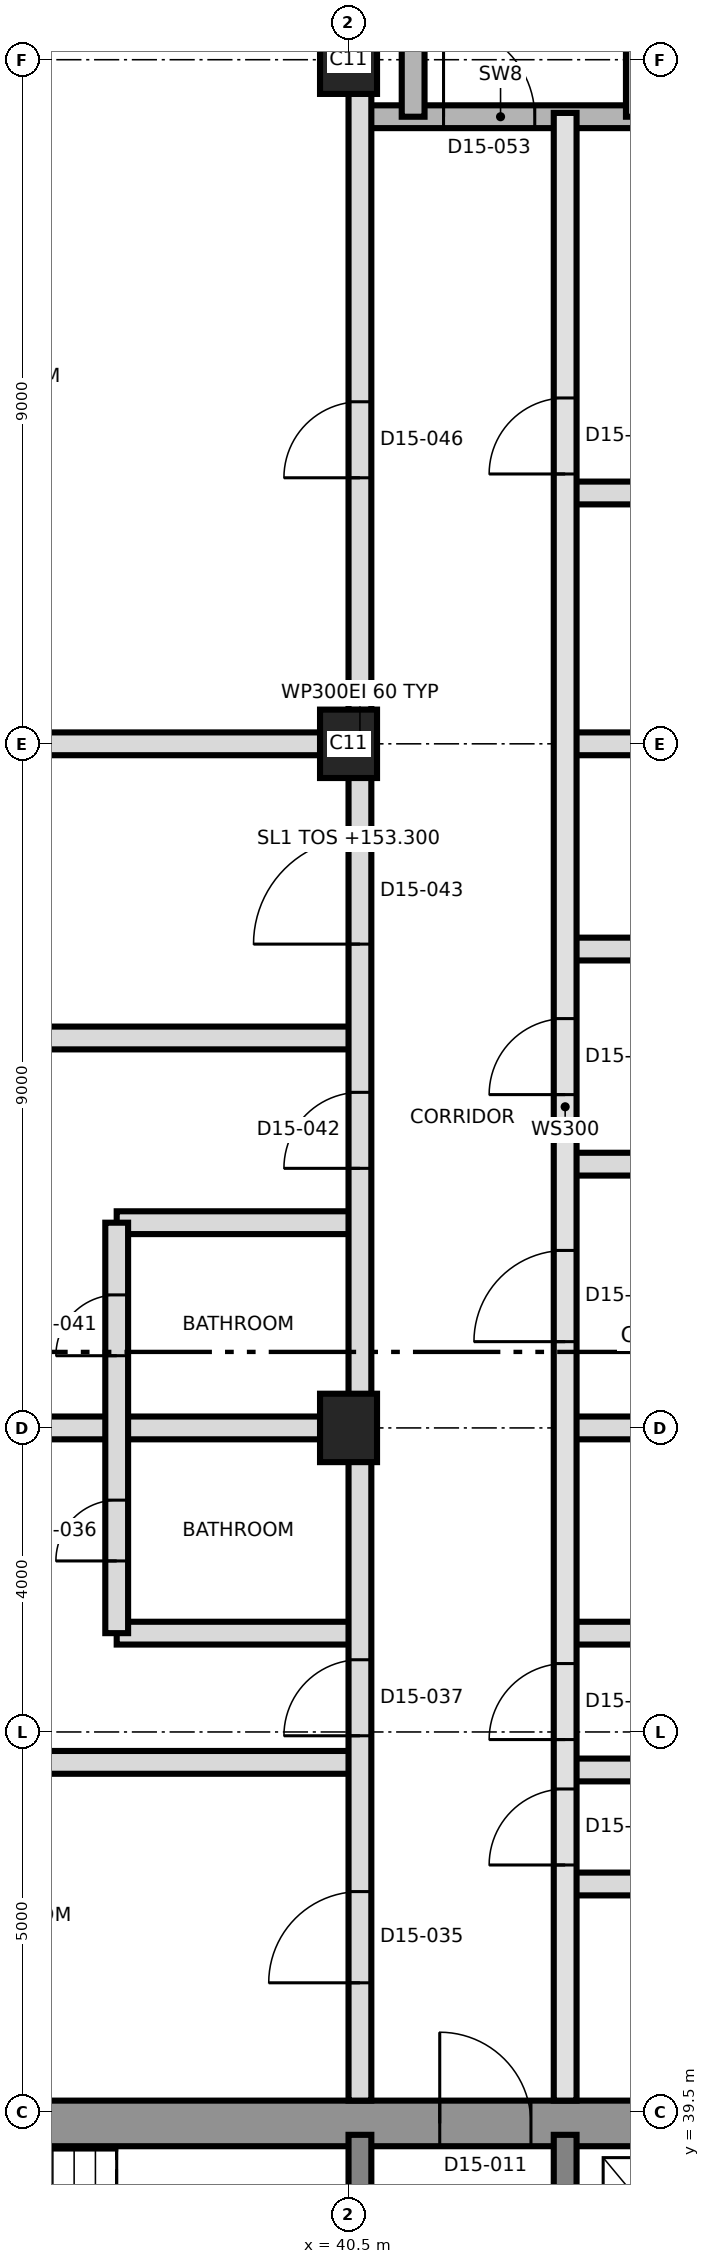
"""IFC4 building model, lengths in metres.
Left out: names, types, materials, properties, quantities, classifications, styles, units other than length and angle.
Written with IfcOpenShell. Run it as: python <this file> out.ifc"""

import sys

from ifc_helpers import new_model, si_unit, direction, frame, frame_2d, origin, origin_2d, place, context, subcontext, project, spatial, rectangle, extrude, element, fill, save


model = new_model("IFC4")
c1 = context("Model", 3, precision=1e-05, world=origin(), true_north=direction((0.0, 1.0)))
c2 = subcontext(c1, "Body", "Model", "MODEL_VIEW")
j1 = project(units=[si_unit("LENGTHUNIT", "METRE"), si_unit("PLANEANGLEUNIT", "RADIAN")], contexts=[c1])
p1 = place(None, origin())
s1 = spatial("IfcSite", under=j1, at=p1, CompositionType="ELEMENT")
p2 = place(p1, origin())
s2 = spatial("IfcBuilding", under=s1, at=p2, CompositionType="ELEMENT")
p3 = place(p2, frame((0.0, 0.0, 153.3)))
s3 = spatial("IfcBuildingStorey", under=s2, at=p3, CompositionType="ELEMENT", Elevation=153.3)
p4 = place(p3, frame((31.2, 39.35, 0.0), z_axis=(0.0, 0.0, 1.0), x_axis=(1.0, 0.0, 0.0)))
e1 = element("IfcWall", 1, at=p4, inside=s3, PredefinedType="SHEAR", context=c2, shape_type="SweptSolid", body=[
    extrude(rectangle(XDim=27.0, YDim=0.6, at=frame_2d((13.5, 0.0))), origin(), (0.0, 0.0, 1.0), 3.7),
])
p5 = place(p4, frame((10.5, 0.0, 0.0)))
e2 = element("IfcOpeningElement", 2, at=p5, cuts=e1, PredefinedType="OPENING", context=c2, shape_type="SweptSolid", body=[
    extrude(rectangle(XDim=1.2, YDim=2.1, at=frame_2d((0.6, 1.05))), frame((0.0, 0.31, 0.0), z_axis=(0.0, -1.0, 0.0), x_axis=(1.0, 0.0, 0.0)), (0.0, 0.0, 1.0), 0.62),
])
for number, where, z_axis, x_axis in (
    (3, (40.65, 33.5, 0.0), (0.0, 0.0, 1.0), (0.0, 1.0, 0.0)),
    (4, (43.35, 33.5, 0.0), (0.0, 0.0, 1.0), (0.0, 1.0, 0.0)),
):
    element("IfcWall", number, at=place(p3, frame(where, z_axis=z_axis, x_axis=x_axis)), inside=s3, PredefinedType="SHEAR", context=c2, shape_type="SweptSolid", body=[
        extrude(rectangle(XDim=5.7, YDim=0.3, at=frame_2d((2.85, 0.0))), origin(), (0.0, 0.0, 1.0), 3.7),
    ])
for number, where, z_axis, x_axis in (
    (5, (40.5, 48.5, 0.0), (0.0, 0.0, 1.0), (0.0, 1.0, 0.0)),
    (6, (40.5, 57.5, 0.0), (0.0, 0.0, 1.0), (0.0, 1.0, 0.0)),
    (7, (40.5, 66.5, 0.0), (0.0, 0.0, 1.0), (0.0, 1.0, 0.0)),
):
    element("IfcColumn", number, at=place(p3, frame(where, z_axis=z_axis, x_axis=x_axis)), inside=s3, PredefinedType="COLUMN", context=c2, shape_type="SweptSolid", body=[
        extrude(rectangle(XDim=0.9, YDim=0.75, at=origin_2d()), origin(), (0.0, 0.0, 1.0), 3.7),
    ])
p6 = place(p3, frame((43.35, 42.5, 0.0), z_axis=(0.0, 0.0, 1.0), x_axis=(1.0, 0.0, 0.0)))
e8 = element("IfcWall", 8, at=p6, inside=s3, PredefinedType="PARTITIONING", context=c2, shape_type="SweptSolid", body=[
    extrude(rectangle(XDim=3.3, YDim=0.3, at=frame_2d((1.65, 0.0))), origin(), (0.0, 0.0, 1.0), 3.4),
])
p7 = place(p3, frame((43.35, 44.0, 0.0), z_axis=(0.0, 0.0, 1.0), x_axis=(1.0, 0.0, 0.0)))
e9 = element("IfcWall", 9, at=p7, inside=s3, PredefinedType="PARTITIONING", context=c2, shape_type="SweptSolid", body=[
    extrude(rectangle(XDim=6.701, YDim=0.3, at=frame_2d((3.351, 0.0))), origin(), (0.0, 0.0, 1.0), 3.4),
])
p8 = place(p3, frame((31.425, 44.1, 0.0), z_axis=(0.0, 0.0, 1.0), x_axis=(1.0, 0.0, 0.0)))
e10 = element("IfcWall", 10, at=p8, inside=s3, PredefinedType="PARTITIONING", context=c2, shape_type="SweptSolid", body=[
    extrude(rectangle(XDim=9.225, YDim=0.3, at=frame_2d((4.612, 0.0))), origin(), (0.0, 0.0, 1.0), 3.4),
])
for number, where, z_axis, x_axis in (
    (11, (37.45, 45.8, 0.0), (0.0, 0.0, 1.0), (1.0, 0.0, 0.0)),
    (12, (43.35, 45.8, 0.0), (0.0, 0.0, 1.0), (1.0, 0.0, 0.0)),
):
    element("IfcWall", number, at=place(p3, frame(where, z_axis=z_axis, x_axis=x_axis)), inside=s3, PredefinedType="PARTITIONING", context=c2, shape_type="SweptSolid", body=[
        extrude(rectangle(XDim=3.2, YDim=0.3, at=frame_2d((1.6, 0.0))), origin(), (0.0, 0.0, 1.0), 3.4),
    ])
p9 = place(p3, frame((31.425, 48.5, 0.0), z_axis=(0.0, 0.0, 1.0), x_axis=(1.0, 0.0, 0.0)))
e13 = element("IfcWall", 13, at=p9, inside=s3, PredefinedType="PARTITIONING", context=c2, shape_type="SweptSolid", body=[
    extrude(rectangle(XDim=9.225, YDim=0.3, at=frame_2d((4.612, 0.0))), origin(), (0.0, 0.0, 1.0), 3.4),
])
p10 = place(p3, frame((43.35, 48.5, 0.0), z_axis=(0.0, 0.0, 1.0), x_axis=(1.0, 0.0, 0.0)))
e14 = element("IfcWall", 14, at=p10, inside=s3, PredefinedType="PARTITIONING", context=c2, shape_type="SweptSolid", body=[
    extrude(rectangle(XDim=6.225, YDim=0.3, at=frame_2d((3.112, 0.0))), origin(), (0.0, 0.0, 1.0), 3.4),
])
p11 = place(p3, frame((37.45, 51.2, 0.0), z_axis=(0.0, 0.0, 1.0), x_axis=(1.0, 0.0, 0.0)))
e15 = element("IfcWall", 15, at=p11, inside=s3, PredefinedType="PARTITIONING", context=c2, shape_type="SweptSolid", body=[
    extrude(rectangle(XDim=3.2, YDim=0.3, at=frame_2d((1.6, 0.0))), origin(), (0.0, 0.0, 1.0), 3.4),
])
p12 = place(p3, frame((43.35, 51.97, 0.0), z_axis=(0.0, 0.0, 1.0), x_axis=(1.0, 0.0, 0.0)))
e16 = element("IfcWall", 16, at=p12, inside=s3, PredefinedType="PARTITIONING", context=c2, shape_type="SweptSolid", body=[
    extrude(rectangle(XDim=6.405, YDim=0.3, at=frame_2d((3.202, 0.0))), origin(), (0.0, 0.0, 1.0), 3.4),
])
p13 = place(p3, frame((31.425, 53.63, 0.0), z_axis=(0.0, 0.0, 1.0), x_axis=(1.0, 0.0, 0.0)))
e17 = element("IfcWall", 17, at=p13, inside=s3, PredefinedType="PARTITIONING", context=c2, shape_type="SweptSolid", body=[
    extrude(rectangle(XDim=9.225, YDim=0.3, at=frame_2d((4.612, 0.0))), origin(), (0.0, 0.0, 1.0), 3.4),
])
p14 = place(p3, frame((43.35, 54.8, 0.0), z_axis=(0.0, 0.0, 1.0), x_axis=(1.0, 0.0, 0.0)))
e18 = element("IfcWall", 18, at=p14, inside=s3, PredefinedType="PARTITIONING", context=c2, shape_type="SweptSolid", body=[
    extrude(rectangle(XDim=3.2, YDim=0.3, at=frame_2d((1.6, 0.0))), origin(), (0.0, 0.0, 1.0), 3.4),
])
p15 = place(p3, frame((31.425, 57.5, 0.0), z_axis=(0.0, 0.0, 1.0), x_axis=(1.0, 0.0, 0.0)))
e19 = element("IfcWall", 19, at=p15, inside=s3, PredefinedType="PARTITIONING", context=c2, shape_type="SweptSolid", body=[
    extrude(rectangle(XDim=9.225, YDim=0.3, at=frame_2d((4.612, 0.0))), origin(), (0.0, 0.0, 1.0), 3.4),
])
p16 = place(p3, frame((43.35, 57.5, 0.0), z_axis=(0.0, 0.0, 1.0), x_axis=(1.0, 0.0, 0.0)))
e20 = element("IfcWall", 20, at=p16, inside=s3, PredefinedType="PARTITIONING", context=c2, shape_type="SweptSolid", body=[
    extrude(rectangle(XDim=6.225, YDim=0.3, at=frame_2d((3.112, 0.0))), origin(), (0.0, 0.0, 1.0), 3.4),
])
p17 = place(p3, frame((43.35, 60.8, 0.0), z_axis=(0.0, 0.0, 1.0), x_axis=(1.0, 0.0, 0.0)))
e21 = element("IfcWall", 21, at=p17, inside=s3, PredefinedType="PARTITIONING", context=c2, shape_type="SweptSolid", body=[
    extrude(rectangle(XDim=3.5, YDim=0.3, at=frame_2d((1.75, 0.0))), origin(), (0.0, 0.0, 1.0), 3.4),
])
p18 = place(p3, frame((40.65, 65.75, 0.0), z_axis=(0.0, 0.0, 1.0), x_axis=(1.0, 0.0, 0.0)))
e22 = element("IfcWall", 22, at=p18, inside=s3, PredefinedType="SHEAR", context=c2, shape_type="SweptSolid", body=[
    extrude(rectangle(XDim=3.7, YDim=0.3, at=frame_2d((1.85, 0.0))), origin(), (0.0, 0.0, 1.0), 3.4),
])
p19 = place(p18, frame((1.1, 0.0, 0.0)))
e23 = element("IfcOpeningElement", 23, at=p19, cuts=e22, PredefinedType="OPENING", context=c2, shape_type="SweptSolid", body=[
    extrude(rectangle(XDim=1.2, YDim=2.1, at=frame_2d((0.6, 1.05))), frame((0.0, 0.16, 0.0), z_axis=(0.0, -1.0, 0.0), x_axis=(1.0, 0.0, 0.0)), (0.0, 0.0, 1.0), 0.32),
])
p20 = place(p3, frame((37.45, 45.8, 0.0), z_axis=(0.0, 0.0, 1.0), x_axis=(0.0, 1.0, 0.0)))
e24 = element("IfcWall", 24, at=p20, inside=s3, PredefinedType="PARTITIONING", context=c2, shape_type="SweptSolid", body=[
    extrude(rectangle(XDim=5.4, YDim=0.3, at=frame_2d((2.7, 0.0))), origin(), (0.0, 0.0, 1.0), 3.4),
])
p21 = place(p20, frame((0.95, 0.0, 0.0)))
e25 = element("IfcOpeningElement", 25, at=p21, cuts=e24, PredefinedType="OPENING", context=c2, shape_type="SweptSolid", body=[
    extrude(rectangle(XDim=0.8, YDim=2.1, at=frame_2d((0.4, 1.05))), frame((0.0, 0.16, 0.0), z_axis=(0.0, -1.0, 0.0), x_axis=(1.0, 0.0, 0.0)), (0.0, 0.0, 1.0), 0.32),
])
p22 = place(p20, frame((3.65, 0.0, 0.0)))
e26 = element("IfcOpeningElement", 26, at=p22, cuts=e24, PredefinedType="OPENING", context=c2, shape_type="SweptSolid", body=[
    extrude(rectangle(XDim=0.8, YDim=2.1, at=frame_2d((0.4, 1.05))), frame((0.0, 0.16, 0.0), z_axis=(0.0, -1.0, 0.0), x_axis=(1.0, 0.0, 0.0)), (0.0, 0.0, 1.0), 0.32),
])
p23 = place(p3, frame((40.65, 39.65, 0.0), z_axis=(0.0, 0.0, 1.0), x_axis=(0.0, 1.0, 0.0)))
e27 = element("IfcWall", 27, at=p23, inside=s3, PredefinedType="PARTITIONING", context=c2, shape_type="SweptSolid", body=[
    extrude(rectangle(XDim=35.925, YDim=0.3, at=frame_2d((17.962, 0.0))), origin(), (0.0, 0.0, 1.0), 3.4),
])
p24 = place(p23, frame((1.55, 0.0, 0.0)))
e28 = element("IfcOpeningElement", 28, at=p24, cuts=e27, PredefinedType="OPENING", context=c2, shape_type="SweptSolid", body=[
    extrude(rectangle(XDim=1.2, YDim=2.1, at=frame_2d((0.6, 1.05))), frame((0.0, 0.16, 0.0), z_axis=(0.0, -1.0, 0.0), x_axis=(1.0, 0.0, 0.0)), (0.0, 0.0, 1.0), 0.32),
])
p25 = place(p23, frame((4.8, 0.0, 0.0)))
e29 = element("IfcOpeningElement", 29, at=p25, cuts=e27, PredefinedType="OPENING", context=c2, shape_type="SweptSolid", body=[
    extrude(rectangle(XDim=1.0, YDim=2.1, at=frame_2d((0.5, 1.05))), frame((0.0, 0.16, 0.0), z_axis=(0.0, -1.0, 0.0), x_axis=(1.0, 0.0, 0.0)), (0.0, 0.0, 1.0), 0.32),
])
p26 = place(p23, frame((12.265, 0.0, 0.0)))
e30 = element("IfcOpeningElement", 30, at=p26, cuts=e27, PredefinedType="OPENING", context=c2, shape_type="SweptSolid", body=[
    extrude(rectangle(XDim=1.0, YDim=2.1, at=frame_2d((0.5, 1.05))), frame((0.0, 0.16, 0.0), z_axis=(0.0, -1.0, 0.0), x_axis=(1.0, 0.0, 0.0)), (0.0, 0.0, 1.0), 0.32),
])
p27 = place(p23, frame((15.215, 0.0, 0.0)))
e31 = element("IfcOpeningElement", 31, at=p27, cuts=e27, PredefinedType="OPENING", context=c2, shape_type="SweptSolid", body=[
    extrude(rectangle(XDim=1.4, YDim=2.1, at=frame_2d((0.7, 1.05))), frame((0.0, 0.16, 0.0), z_axis=(0.0, -1.0, 0.0), x_axis=(1.0, 0.0, 0.0)), (0.0, 0.0, 1.0), 0.32),
])
p28 = place(p23, frame((21.35, 0.0, 0.0)))
e32 = element("IfcOpeningElement", 32, at=p28, cuts=e27, PredefinedType="OPENING", context=c2, shape_type="SweptSolid", body=[
    extrude(rectangle(XDim=1.0, YDim=2.4, at=frame_2d((0.5, 1.2))), frame((0.0, 0.16, 0.0), z_axis=(0.0, -1.0, 0.0), x_axis=(1.0, 0.0, 0.0)), (0.0, 0.0, 1.0), 0.32),
])
p29 = place(p3, frame((41.35, 65.75, 0.0), z_axis=(0.0, 0.0, 1.0), x_axis=(0.0, 1.0, 0.0)))
e33 = element("IfcWall", 33, at=p29, inside=s3, PredefinedType="SHEAR", context=c2, shape_type="SweptSolid", body=[
    extrude(rectangle(XDim=8.85, YDim=0.3, at=frame_2d((4.425, 0.0))), origin(), (0.0, 0.0, 1.0), 3.4),
])
p30 = place(p3, frame((43.35, 39.65, 0.0), z_axis=(0.0, 0.0, 1.0), x_axis=(0.0, 1.0, 0.0)))
e34 = element("IfcWall", 34, at=p30, inside=s3, PredefinedType="SOLIDWALL", context=c2, shape_type="SweptSolid", body=[
    extrude(rectangle(XDim=26.15, YDim=0.3, at=frame_2d((13.075, 0.0))), origin(), (0.0, 0.0, 1.0), 3.4),
])
p31 = place(p30, frame((3.1, 0.0, 0.0)))
e35 = element("IfcOpeningElement", 35, at=p31, cuts=e34, PredefinedType="OPENING", context=c2, shape_type="SweptSolid", body=[
    extrude(rectangle(XDim=1.0, YDim=2.1, at=frame_2d((0.5, 1.05))), frame((0.0, 0.16, 0.0), z_axis=(0.0, -1.0, 0.0), x_axis=(1.0, 0.0, 0.0)), (0.0, 0.0, 1.0), 0.32),
])
p32 = place(p30, frame((4.75, 0.0, 0.0)))
e36 = element("IfcOpeningElement", 36, at=p32, cuts=e34, PredefinedType="OPENING", context=c2, shape_type="SweptSolid", body=[
    extrude(rectangle(XDim=1.0, YDim=2.1, at=frame_2d((0.5, 1.05))), frame((0.0, 0.16, 0.0), z_axis=(0.0, -1.0, 0.0), x_axis=(1.0, 0.0, 0.0)), (0.0, 0.0, 1.0), 0.32),
])
p33 = place(p30, frame((9.985, 0.0, 0.0)))
e37 = element("IfcOpeningElement", 37, at=p33, cuts=e34, PredefinedType="OPENING", context=c2, shape_type="SweptSolid", body=[
    extrude(rectangle(XDim=1.2, YDim=2.1, at=frame_2d((0.6, 1.05))), frame((0.0, 0.16, 0.0), z_axis=(0.0, -1.0, 0.0), x_axis=(1.0, 0.0, 0.0)), (0.0, 0.0, 1.0), 0.32),
])
p34 = place(p30, frame((13.235, 0.0, 0.0)))
e38 = element("IfcOpeningElement", 38, at=p34, cuts=e34, PredefinedType="OPENING", context=c2, shape_type="SweptSolid", body=[
    extrude(rectangle(XDim=1.0, YDim=2.1, at=frame_2d((0.5, 1.05))), frame((0.0, 0.16, 0.0), z_axis=(0.0, -1.0, 0.0), x_axis=(1.0, 0.0, 0.0)), (0.0, 0.0, 1.0), 0.32),
])
p35 = place(p30, frame((21.4, 0.0, 0.0)))
e39 = element("IfcOpeningElement", 39, at=p35, cuts=e34, PredefinedType="OPENING", context=c2, shape_type="SweptSolid", body=[
    extrude(rectangle(XDim=1.0, YDim=2.4, at=frame_2d((0.5, 1.2))), frame((0.0, 0.16, 0.0), z_axis=(0.0, -1.0, 0.0), x_axis=(1.0, 0.0, 0.0)), (0.0, 0.0, 1.0), 0.32),
])
p36 = place(p3, frame((44.3, 65.75, 0.0), z_axis=(0.0, 0.0, 1.0), x_axis=(0.0, 1.0, 0.0)))
e40 = element("IfcWall", 40, at=p36, inside=s3, PredefinedType="SHEAR", context=c2, shape_type="SweptSolid", body=[
    extrude(rectangle(XDim=8.85, YDim=0.3, at=frame_2d((4.425, 0.0))), origin(), (0.0, 0.0, 1.0), 3.4),
])
p37 = place(p5, origin())
e41 = element("IfcDoor", 41, at=p37, inside=s3, OperationType="SINGLE_SWING_RIGHT", PredefinedType="DOOR", context=c2, shape_type="SweptSolid", body=[
    extrude(rectangle(XDim=1.2, YDim=2.1, at=frame_2d((0.6, 1.05))), frame((0.0, 0.025, 0.0), z_axis=(0.0, -1.0, 0.0), x_axis=(1.0, 0.0, 0.0)), (0.0, 0.0, 1.0), 0.05),
])
fill(e2, e41)
p38 = place(p31, origin())
e42 = element("IfcDoor", 42, at=p38, inside=s3, OperationType="SINGLE_SWING_RIGHT", PredefinedType="DOOR", context=c2, shape_type="SweptSolid", body=[
    extrude(rectangle(XDim=1.0, YDim=2.1, at=frame_2d((0.5, 1.05))), frame((0.0, 0.025, 0.0), z_axis=(0.0, -1.0, 0.0), x_axis=(1.0, 0.0, 0.0)), (0.0, 0.0, 1.0), 0.05),
])
fill(e35, e42)
p39 = place(p32, origin())
e43 = element("IfcDoor", 43, at=p39, inside=s3, OperationType="SINGLE_SWING_LEFT", PredefinedType="DOOR", context=c2, shape_type="SweptSolid", body=[
    extrude(rectangle(XDim=1.0, YDim=2.1, at=frame_2d((0.5, 1.05))), frame((0.0, 0.025, 0.0), z_axis=(0.0, -1.0, 0.0), x_axis=(1.0, 0.0, 0.0)), (0.0, 0.0, 1.0), 0.05),
])
fill(e36, e43)
p40 = place(p24, origin())
e44 = element("IfcDoor", 44, at=p40, inside=s3, OperationType="SINGLE_SWING_LEFT", PredefinedType="DOOR", context=c2, shape_type="SweptSolid", body=[
    extrude(rectangle(XDim=1.2, YDim=2.1, at=frame_2d((0.6, 1.05))), frame((0.0, 0.025, 0.0), z_axis=(0.0, -1.0, 0.0), x_axis=(1.0, 0.0, 0.0)), (0.0, 0.0, 1.0), 0.05),
])
fill(e28, e44)
p41 = place(p21, origin())
e45 = element("IfcDoor", 45, at=p41, inside=s3, OperationType="SINGLE_SWING_RIGHT", PredefinedType="DOOR", context=c2, shape_type="SweptSolid", body=[
    extrude(rectangle(XDim=0.8, YDim=2.1, at=frame_2d((0.4, 1.05))), frame((0.0, 0.025, 0.0), z_axis=(0.0, -1.0, 0.0), x_axis=(1.0, 0.0, 0.0)), (0.0, 0.0, 1.0), 0.05),
])
fill(e25, e45)
p42 = place(p25, origin())
e46 = element("IfcDoor", 46, at=p42, inside=s3, OperationType="SINGLE_SWING_LEFT", PredefinedType="DOOR", context=c2, shape_type="SweptSolid", body=[
    extrude(rectangle(XDim=1.0, YDim=2.1, at=frame_2d((0.5, 1.05))), frame((0.0, 0.025, 0.0), z_axis=(0.0, -1.0, 0.0), x_axis=(1.0, 0.0, 0.0)), (0.0, 0.0, 1.0), 0.05),
])
fill(e29, e46)
p43 = place(p33, origin())
e47 = element("IfcDoor", 47, at=p43, inside=s3, OperationType="SINGLE_SWING_LEFT", PredefinedType="DOOR", context=c2, shape_type="SweptSolid", body=[
    extrude(rectangle(XDim=1.2, YDim=2.1, at=frame_2d((0.6, 1.05))), frame((0.0, 0.025, 0.0), z_axis=(0.0, -1.0, 0.0), x_axis=(1.0, 0.0, 0.0)), (0.0, 0.0, 1.0), 0.05),
])
fill(e37, e47)
p44 = place(p34, origin())
e48 = element("IfcDoor", 48, at=p44, inside=s3, OperationType="SINGLE_SWING_LEFT", PredefinedType="DOOR", context=c2, shape_type="SweptSolid", body=[
    extrude(rectangle(XDim=1.0, YDim=2.1, at=frame_2d((0.5, 1.05))), frame((0.0, 0.025, 0.0), z_axis=(0.0, -1.0, 0.0), x_axis=(1.0, 0.0, 0.0)), (0.0, 0.0, 1.0), 0.05),
])
fill(e38, e48)
p45 = place(p22, origin())
e49 = element("IfcDoor", 49, at=p45, inside=s3, OperationType="SINGLE_SWING_LEFT", PredefinedType="DOOR", context=c2, shape_type="SweptSolid", body=[
    extrude(rectangle(XDim=0.8, YDim=2.1, at=frame_2d((0.4, 1.05))), frame((0.0, 0.025, 0.0), z_axis=(0.0, -1.0, 0.0), x_axis=(1.0, 0.0, 0.0)), (0.0, 0.0, 1.0), 0.05),
])
fill(e26, e49)
p46 = place(p26, origin())
e50 = element("IfcDoor", 50, at=p46, inside=s3, OperationType="SINGLE_SWING_LEFT", PredefinedType="DOOR", context=c2, shape_type="SweptSolid", body=[
    extrude(rectangle(XDim=1.0, YDim=2.1, at=frame_2d((0.5, 1.05))), frame((0.0, 0.025, 0.0), z_axis=(0.0, -1.0, 0.0), x_axis=(1.0, 0.0, 0.0)), (0.0, 0.0, 1.0), 0.05),
])
fill(e30, e50)
p47 = place(p27, origin())
e51 = element("IfcDoor", 51, at=p47, inside=s3, OperationType="SINGLE_SWING_RIGHT", PredefinedType="DOOR", context=c2, shape_type="SweptSolid", body=[
    extrude(rectangle(XDim=1.4, YDim=2.1, at=frame_2d((0.7, 1.05))), frame((0.0, 0.025, 0.0), z_axis=(0.0, -1.0, 0.0), x_axis=(1.0, 0.0, 0.0)), (0.0, 0.0, 1.0), 0.05),
])
fill(e31, e51)
p48 = place(p35, origin())
e52 = element("IfcDoor", 52, at=p48, inside=s3, OperationType="SINGLE_SWING_LEFT", PredefinedType="DOOR", context=c2, shape_type="SweptSolid", body=[
    extrude(rectangle(XDim=1.0, YDim=2.4, at=frame_2d((0.5, 1.2))), frame((0.0, 0.025, 0.0), z_axis=(0.0, -1.0, 0.0), x_axis=(1.0, 0.0, 0.0)), (0.0, 0.0, 1.0), 0.05),
])
fill(e39, e52)
p49 = place(p28, origin())
e53 = element("IfcDoor", 53, at=p49, inside=s3, OperationType="SINGLE_SWING_RIGHT", PredefinedType="DOOR", context=c2, shape_type="SweptSolid", body=[
    extrude(rectangle(XDim=1.0, YDim=2.4, at=frame_2d((0.5, 1.2))), frame((0.0, 0.025, 0.0), z_axis=(0.0, -1.0, 0.0), x_axis=(1.0, 0.0, 0.0)), (0.0, 0.0, 1.0), 0.05),
])
fill(e32, e53)
p50 = place(p19, origin())
e54 = element("IfcDoor", 54, at=p50, inside=s3, OperationType="SINGLE_SWING_RIGHT", PredefinedType="DOOR", context=c2, shape_type="SweptSolid", body=[
    extrude(rectangle(XDim=1.2, YDim=2.1, at=frame_2d((0.6, 1.05))), frame((0.0, 0.025, 0.0), z_axis=(0.0, -1.0, 0.0), x_axis=(1.0, 0.0, 0.0)), (0.0, 0.0, 1.0), 0.05),
])
fill(e23, e54)
save(model, sys.argv[1])
